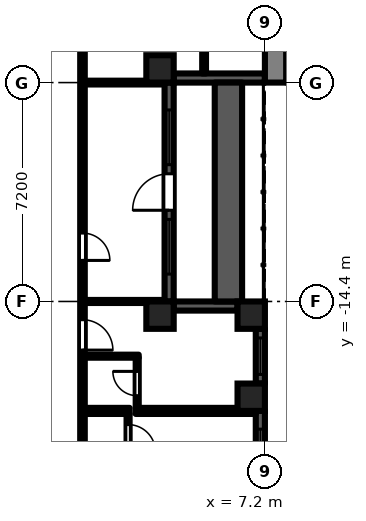
"""IFC4 building model, lengths in metres.
Left out: names, types, materials, properties, quantities, classifications, styles, units other than length and angle.
Written with IfcOpenShell. Run it as: python <this file> out.ifc"""

import sys

from ifc_helpers import new_model, si_unit, direction, frame, frame_2d, origin, origin_2d, place, context, subcontext, project, spatial, rectangle, extrude, element, fill, save


model = new_model("IFC4")
c1 = context("Model", 3, precision=1e-05, world=origin(), true_north=direction((0.0, 1.0)))
c2 = subcontext(c1, "Body", "Model", "MODEL_VIEW")
j1 = project(units=[si_unit("LENGTHUNIT", "METRE"), si_unit("PLANEANGLEUNIT", "RADIAN")], contexts=[c1])
p1 = place(None, origin())
s1 = spatial("IfcSite", under=j1, at=p1, CompositionType="ELEMENT")
p2 = place(p1, origin())
s2 = spatial("IfcBuilding", under=s1, at=p2, CompositionType="ELEMENT")
p3 = place(p2, frame((0.0, 0.0, 29.7)))
s3 = spatial("IfcBuildingStorey", under=s2, at=p3, CompositionType="ELEMENT", Elevation=29.7)
for number, where, z_axis, x_axis in (
    (1, (3.75, -14.85, 0.0), (0.0, 0.0, 1.0), (1.0, 0.0, 0.0)),
    (2, (3.75, -6.75, 0.0), (0.0, 0.0, 1.0), (1.0, 0.0, 0.0)),
    (3, (6.75, -17.55, 0.0), (0.0, 0.0, 1.0), (1.0, 0.0, 0.0)),
    (4, (6.75, -14.85, 0.0), (0.0, 0.0, 1.0), (1.0, 0.0, 0.0)),
):
    element("IfcColumn", number, at=place(p3, frame(where, z_axis=z_axis, x_axis=x_axis)), inside=s3, PredefinedType="COLUMN", context=c2, shape_type="SweptSolid", body=[
        extrude(rectangle(XDim=0.9, YDim=0.9, at=origin_2d()), origin(), (0.0, 0.0, 1.0), 3.0),
    ])
p4 = place(p3, frame((7.05, -21.15, 0.0), z_axis=(0.0, 0.0, 1.0), x_axis=(0.0, 1.0, 0.0)))
e5 = element("IfcWall", 5, at=p4, inside=s3, PredefinedType="SOLIDWALL", context=c2, shape_type="SweptSolid", body=[
    extrude(rectangle(XDim=3.15, YDim=0.3, at=frame_2d((1.575, 0.0))), origin(), (0.0, 0.0, 1.0), 2.1),
])
p5 = place(p4, frame((0.15, 0.0, 0.2)))
e6 = element("IfcOpeningElement", 6, at=p5, cuts=e5, PredefinedType="OPENING", context=c2, shape_type="SweptSolid", body=[
    extrude(rectangle(XDim=2.4, YDim=1.85, at=frame_2d((1.2, 0.925))), frame((0.0, 0.16, 0.0), z_axis=(0.0, -1.0, 0.0), x_axis=(1.0, 0.0, 0.0)), (0.0, 0.0, 1.0), 0.32),
])
p6 = place(p3, frame((7.05, -17.1, 0.0), z_axis=(0.0, 0.0, 1.0), x_axis=(0.0, 1.0, 0.0)))
e7 = element("IfcWall", 7, at=p6, inside=s3, PredefinedType="SOLIDWALL", context=c2, shape_type="SweptSolid", body=[
    extrude(rectangle(XDim=1.8, YDim=0.3, at=frame_2d((0.9, 0.0))), origin(), (0.0, 0.0, 1.0), 2.1),
])
p7 = place(p6, frame((0.3, 0.0, 0.2)))
e8 = element("IfcOpeningElement", 8, at=p7, cuts=e7, PredefinedType="OPENING", context=c2, shape_type="SweptSolid", body=[
    extrude(rectangle(XDim=1.2, YDim=1.85, at=frame_2d((0.6, 0.925))), frame((0.0, 0.16, 0.0), z_axis=(0.0, -1.0, 0.0), x_axis=(1.0, 0.0, 0.0)), (0.0, 0.0, 1.0), 0.32),
])
p8 = place(p3, frame((6.3, -14.55, 0.0), z_axis=(0.0, 0.0, 1.0), x_axis=(-1.0, 0.0, 0.0)))
e9 = element("IfcWall", 9, at=p8, inside=s3, PredefinedType="SOLIDWALL", context=c2, shape_type="SweptSolid", body=[
    extrude(rectangle(XDim=2.1, YDim=0.3, at=frame_2d((1.05, 0.0))), origin(), (0.0, 0.0, 1.0), 2.1),
])
p9 = place(p3, frame((4.05, -14.4, 0.0), z_axis=(0.0, 0.0, 1.0), x_axis=(0.0, 1.0, 0.0)))
e10 = element("IfcWall", 10, at=p9, inside=s3, PredefinedType="SOLIDWALL", context=c2, shape_type="SweptSolid", body=[
    extrude(rectangle(XDim=7.2, YDim=0.3, at=frame_2d((3.6, 0.0))), origin(), (0.0, 0.0, 1.0), 2.1),
])
p10 = place(p9, frame((3.0, 0.0, 0.0)))
e11 = element("IfcOpeningElement", 11, at=p10, cuts=e10, PredefinedType="OPENING", context=c2, shape_type="SweptSolid", body=[
    extrude(rectangle(XDim=1.2, YDim=2.05, at=frame_2d((0.6, 1.025))), frame((0.0, 0.16, 0.0), z_axis=(0.0, -1.0, 0.0), x_axis=(1.0, 0.0, 0.0)), (0.0, 0.0, 1.0), 0.32),
])
p11 = place(p9, frame((0.9, 0.0, 0.2)))
e12 = element("IfcOpeningElement", 12, at=p11, cuts=e10, PredefinedType="OPENING", context=c2, shape_type="SweptSolid", body=[
    extrude(rectangle(XDim=1.8, YDim=1.85, at=frame_2d((0.9, 0.925))), frame((0.0, 0.16, 0.0), z_axis=(0.0, -1.0, 0.0), x_axis=(1.0, 0.0, 0.0)), (0.0, 0.0, 1.0), 0.32),
])
p12 = place(p9, frame((4.5, 0.0, 0.2)))
e13 = element("IfcOpeningElement", 13, at=p12, cuts=e10, PredefinedType="OPENING", context=c2, shape_type="SweptSolid", body=[
    extrude(rectangle(XDim=1.8, YDim=1.85, at=frame_2d((0.9, 0.925))), frame((0.0, 0.16, 0.0), z_axis=(0.0, -1.0, 0.0), x_axis=(1.0, 0.0, 0.0)), (0.0, 0.0, 1.0), 0.32),
])
p13 = place(p3, frame((4.2, -7.05, 0.0), z_axis=(0.0, 0.0, 1.0), x_axis=(1.0, 0.0, 0.0)))
e14 = element("IfcWall", 14, at=p13, inside=s3, PredefinedType="SOLIDWALL", context=c2, shape_type="SweptSolid", body=[
    extrude(rectangle(XDim=3.0, YDim=0.3, at=frame_2d((1.5, 0.0))), origin(), (0.0, 0.0, 1.0), 2.1),
])
p14 = place(p3, frame((6.0, -14.4, 0.0), z_axis=(0.0, 0.0, 1.0), x_axis=(0.0, 1.0, 0.0)))
e15 = element("IfcWall", 15, at=p14, inside=s3, PredefinedType="PARAPET", context=c2, shape_type="SweptSolid", body=[
    extrude(rectangle(XDim=7.2, YDim=0.9, at=frame_2d((3.6, 0.0))), origin(), (0.0, 0.0, 1.0), 0.8),
])
p15 = place(p3, frame((7.55, -7.2, 0.0), z_axis=(0.0, 0.0, 1.0), x_axis=(0.0, 1.0, 0.0)))
e16 = element("IfcWall", 16, at=p15, inside=s3, PredefinedType="SHEAR", context=c2, shape_type="SweptSolid", body=[
    extrude(rectangle(XDim=14.4, YDim=0.7, at=frame_2d((7.2, 0.0))), origin(), (0.0, 0.0, 1.0), 2.575),
])
p16 = place(p15, frame((6.0, 0.0, 0.0)))
e17 = element("IfcOpeningElement", 17, at=p16, cuts=e16, PredefinedType="OPENING", context=c2, shape_type="SweptSolid", body=[
    extrude(rectangle(XDim=2.4, YDim=2.2, at=frame_2d((1.2, 1.1))), frame((0.0, 0.36, 0.0), z_axis=(0.0, -1.0, 0.0), x_axis=(1.0, 0.0, 0.0)), (0.0, 0.0, 1.0), 0.72),
])
p17 = place(p3, frame((1.2, -36.5, 0.0), z_axis=(0.0, 0.0, 1.0), x_axis=(0.0, 1.0, 0.0)))
e18 = element("IfcWall", 18, at=p17, inside=s3, PredefinedType="PARTITIONING", context=c2, shape_type="SweptSolid", body=[
    extrude(rectangle(XDim=35.375, YDim=0.15, at=frame_2d((17.688, 0.0))), origin(), (0.0, 0.0, 1.0), 2.575),
])
p18 = place(p17, frame((31.85, 0.0, 0.0)))
e19 = element("IfcOpeningElement", 19, at=p18, cuts=e18, PredefinedType="OPENING", context=c2, shape_type="SweptSolid", body=[
    extrude(rectangle(XDim=0.9, YDim=2.1, at=frame_2d((0.45, 1.05))), frame((0.0, 0.085, 0.0), z_axis=(0.0, -1.0, 0.0), x_axis=(1.0, 0.0, 0.0)), (0.0, 0.0, 1.0), 0.17),
])
p19 = place(p17, frame((23.45, 0.0, 0.0)))
e20 = element("IfcOpeningElement", 20, at=p19, cuts=e18, PredefinedType="OPENING", context=c2, shape_type="SweptSolid", body=[
    extrude(rectangle(XDim=0.9, YDim=2.1, at=frame_2d((0.45, 1.05))), frame((0.0, 0.085, 0.0), z_axis=(0.0, -1.0, 0.0), x_axis=(1.0, 0.0, 0.0)), (0.0, 0.0, 1.0), 0.17),
])
p20 = place(p17, frame((20.5, 0.0, 0.0)))
e21 = element("IfcOpeningElement", 21, at=p20, cuts=e18, PredefinedType="OPENING", context=c2, shape_type="SweptSolid", body=[
    extrude(rectangle(XDim=1.0, YDim=2.1, at=frame_2d((0.5, 1.05))), frame((0.0, 0.085, 0.0), z_axis=(0.0, -1.0, 0.0), x_axis=(1.0, 0.0, 0.0)), (0.0, 0.0, 1.0), 0.17),
])
p21 = place(p17, frame((1.55, 0.0, 0.0)))
e22 = element("IfcOpeningElement", 22, at=p21, cuts=e18, PredefinedType="OPENING", context=c2, shape_type="SweptSolid", body=[
    extrude(rectangle(XDim=1.0, YDim=2.1, at=frame_2d((0.5, 1.05))), frame((0.0, 0.085, 0.0), z_axis=(0.0, -1.0, 0.0), x_axis=(1.0, 0.0, 0.0)), (0.0, 0.0, 1.0), 0.17),
])
p22 = place(p3, frame((1.275, -18.0, 0.0), z_axis=(0.0, 0.0, 1.0), x_axis=(1.0, 0.0, 0.0)))
e23 = element("IfcWall", 23, at=p22, inside=s3, PredefinedType="PARTITIONING", context=c2, shape_type="SweptSolid", body=[
    extrude(rectangle(XDim=1.475, YDim=0.2, at=frame_2d((0.738, 0.0))), origin(), (0.0, 0.0, 1.0), 2.575),
])
p23 = place(p3, frame((1.275, -16.2, 0.0), z_axis=(0.0, 0.0, 1.0), x_axis=(1.0, 0.0, 0.0)))
e24 = element("IfcWall", 24, at=p23, inside=s3, PredefinedType="PARTITIONING", context=c2, shape_type="SweptSolid", body=[
    extrude(rectangle(XDim=1.775, YDim=0.1, at=frame_2d((0.888, 0.0))), origin(), (0.0, 0.0, 1.0), 2.575),
])
p24 = place(p3, frame((1.275, -14.4, 0.0), z_axis=(0.0, 0.0, 1.0), x_axis=(1.0, 0.0, 0.0)))
e25 = element("IfcWall", 25, at=p24, inside=s3, PredefinedType="PARTITIONING", context=c2, shape_type="SweptSolid", body=[
    extrude(rectangle(XDim=2.625, YDim=0.1, at=frame_2d((1.312, 0.0))), origin(), (0.0, 0.0, 1.0), 2.575),
])
p25 = place(p3, frame((1.275, -7.2, 0.0), z_axis=(0.0, 0.0, 1.0), x_axis=(1.0, 0.0, 0.0)))
e26 = element("IfcWall", 26, at=p25, inside=s3, PredefinedType="PARTITIONING", context=c2, shape_type="SweptSolid", body=[
    extrude(rectangle(XDim=2.625, YDim=0.125, at=frame_2d((1.312, 0.0))), origin(), (0.0, 0.0, 1.0), 2.575),
])
p26 = place(p3, frame((2.7, -32.35, 0.0), z_axis=(0.0, 0.0, 1.0), x_axis=(0.0, 1.0, 0.0)))
e27 = element("IfcWall", 27, at=p26, inside=s3, PredefinedType="PARTITIONING", context=c2, shape_type="SweptSolid", body=[
    extrude(rectangle(XDim=14.25, YDim=0.1, at=frame_2d((7.125, 0.0))), origin(), (0.0, 0.0, 1.0), 2.575),
])
p27 = place(p26, frame((0.4, 0.0, 0.0)))
e28 = element("IfcOpeningElement", 28, at=p27, cuts=e27, PredefinedType="OPENING", context=c2, shape_type="SweptSolid", body=[
    extrude(rectangle(XDim=0.9, YDim=2.1, at=frame_2d((0.45, 1.05))), frame((0.0, 0.06, 0.0), z_axis=(0.0, -1.0, 0.0), x_axis=(1.0, 0.0, 0.0)), (0.0, 0.0, 1.0), 0.12),
])
p28 = place(p26, frame((5.8, 0.0, 0.0)))
e29 = element("IfcOpeningElement", 29, at=p28, cuts=e27, PredefinedType="OPENING", context=c2, shape_type="SweptSolid", body=[
    extrude(rectangle(XDim=0.9, YDim=2.1, at=frame_2d((0.45, 1.05))), frame((0.0, 0.06, 0.0), z_axis=(0.0, -1.0, 0.0), x_axis=(1.0, 0.0, 0.0)), (0.0, 0.0, 1.0), 0.12),
])
p29 = place(p26, frame((7.6, 0.0, 0.0)))
e30 = element("IfcOpeningElement", 30, at=p29, cuts=e27, PredefinedType="OPENING", context=c2, shape_type="SweptSolid", body=[
    extrude(rectangle(XDim=0.9, YDim=2.1, at=frame_2d((0.45, 1.05))), frame((0.0, 0.06, 0.0), z_axis=(0.0, -1.0, 0.0), x_axis=(1.0, 0.0, 0.0)), (0.0, 0.0, 1.0), 0.12),
])
p30 = place(p26, frame((13.0, 0.0, 0.0)))
e31 = element("IfcOpeningElement", 31, at=p30, cuts=e27, PredefinedType="OPENING", context=c2, shape_type="SweptSolid", body=[
    extrude(rectangle(XDim=0.9, YDim=2.1, at=frame_2d((0.45, 1.05))), frame((0.0, 0.06, 0.0), z_axis=(0.0, -1.0, 0.0), x_axis=(1.0, 0.0, 0.0)), (0.0, 0.0, 1.0), 0.12),
])
p31 = place(p3, frame((3.0, -17.9, 0.0), z_axis=(0.0, 0.0, 1.0), x_axis=(0.0, 1.0, 0.0)))
e32 = element("IfcWall", 32, at=p31, inside=s3, PredefinedType="PARTITIONING", context=c2, shape_type="SweptSolid", body=[
    extrude(rectangle(XDim=1.65, YDim=0.1, at=frame_2d((0.825, 0.0))), origin(), (0.0, 0.0, 1.0), 2.575),
])
p32 = place(p31, frame((0.4, 0.0, 0.0)))
e33 = element("IfcOpeningElement", 33, at=p32, cuts=e32, PredefinedType="OPENING", context=c2, shape_type="SweptSolid", body=[
    extrude(rectangle(XDim=0.8, YDim=2.1, at=frame_2d((0.4, 1.05))), frame((0.0, 0.06, 0.0), z_axis=(0.0, -1.0, 0.0), x_axis=(1.0, 0.0, 0.0)), (0.0, 0.0, 1.0), 0.12),
])
p33 = place(p3, frame((2.95, -18.0, 0.0), z_axis=(0.0, 0.0, 1.0), x_axis=(1.0, 0.0, 0.0)))
e34 = element("IfcWall", 34, at=p33, inside=s3, PredefinedType="PARTITIONING", context=c2, shape_type="SweptSolid", body=[
    extrude(rectangle(XDim=3.95, YDim=0.2, at=frame_2d((1.975, 0.0))), origin(), (0.0, 0.0, 1.0), 2.575),
])
p34 = place(p3, frame((5.2, -6.9, 0.0), z_axis=(0.0, 0.0, 1.0), x_axis=(0.0, 1.0, 0.0)))
e35 = element("IfcWall", 35, at=p34, inside=s3, PredefinedType="PARTITIONING", context=c2, shape_type="SweptSolid", body=[
    extrude(rectangle(XDim=5.625, YDim=0.125, at=frame_2d((2.812, 0.0))), origin(), (0.0, 0.0, 1.0), 2.575),
])
p35 = place(p5, origin())
e36 = element("IfcWindow", 36, at=p35, inside=s3, PartitioningType="SINGLE_PANEL", PredefinedType="WINDOW", context=c2, shape_type="SweptSolid", body=[
    extrude(rectangle(XDim=2.4, YDim=1.85, at=frame_2d((1.2, 0.925))), frame((0.0, 0.03, 0.0), z_axis=(0.0, -1.0, 0.0), x_axis=(1.0, 0.0, 0.0)), (0.0, 0.0, 1.0), 0.06),
])
fill(e6, e36)
p36 = place(p7, origin())
e37 = element("IfcWindow", 37, at=p36, inside=s3, PartitioningType="SINGLE_PANEL", PredefinedType="WINDOW", context=c2, shape_type="SweptSolid", body=[
    extrude(rectangle(XDim=1.2, YDim=1.85, at=frame_2d((0.6, 0.925))), frame((0.0, 0.03, 0.0), z_axis=(0.0, -1.0, 0.0), x_axis=(1.0, 0.0, 0.0)), (0.0, 0.0, 1.0), 0.06),
])
fill(e8, e37)
p37 = place(p10, origin())
e38 = element("IfcDoor", 38, at=p37, inside=s3, OperationType="SINGLE_SWING_LEFT", PredefinedType="DOOR", context=c2, shape_type="SweptSolid", body=[
    extrude(rectangle(XDim=1.2, YDim=2.05, at=frame_2d((0.6, 1.025))), frame((0.0, 0.025, 0.0), z_axis=(0.0, -1.0, 0.0), x_axis=(1.0, 0.0, 0.0)), (0.0, 0.0, 1.0), 0.05),
])
fill(e11, e38)
p38 = place(p11, origin())
e39 = element("IfcWindow", 39, at=p38, inside=s3, PartitioningType="SINGLE_PANEL", PredefinedType="WINDOW", context=c2, shape_type="SweptSolid", body=[
    extrude(rectangle(XDim=1.8, YDim=1.85, at=frame_2d((0.9, 0.925))), frame((0.0, 0.03, 0.0), z_axis=(0.0, -1.0, 0.0), x_axis=(1.0, 0.0, 0.0)), (0.0, 0.0, 1.0), 0.06),
])
fill(e12, e39)
p39 = place(p12, origin())
e40 = element("IfcWindow", 40, at=p39, inside=s3, PartitioningType="SINGLE_PANEL", PredefinedType="WINDOW", context=c2, shape_type="SweptSolid", body=[
    extrude(rectangle(XDim=1.8, YDim=1.85, at=frame_2d((0.9, 0.925))), frame((0.0, 0.03, 0.0), z_axis=(0.0, -1.0, 0.0), x_axis=(1.0, 0.0, 0.0)), (0.0, 0.0, 1.0), 0.06),
])
fill(e13, e40)
p40 = place(p19, frame((0.9, 0.0, 0.0), z_axis=(0.0, 0.0, 1.0), x_axis=(-1.0, 0.0, 0.0)))
e41 = element("IfcDoor", 41, at=p40, inside=s3, OperationType="SINGLE_SWING_RIGHT", PredefinedType="DOOR", context=c2, shape_type="SweptSolid", body=[
    extrude(rectangle(XDim=0.9, YDim=2.1, at=frame_2d((0.45, 1.05))), frame((0.0, 0.025, 0.0), z_axis=(0.0, -1.0, 0.0), x_axis=(1.0, 0.0, 0.0)), (0.0, 0.0, 1.0), 0.05),
])
fill(e20, e41)
p41 = place(p32, origin())
e42 = element("IfcDoor", 42, at=p41, inside=s3, OperationType="SINGLE_SWING_RIGHT", PredefinedType="DOOR", context=c2, shape_type="SweptSolid", body=[
    extrude(rectangle(XDim=0.8, YDim=2.1, at=frame_2d((0.4, 1.05))), frame((0.0, 0.025, 0.0), z_axis=(0.0, -1.0, 0.0), x_axis=(1.0, 0.0, 0.0)), (0.0, 0.0, 1.0), 0.05),
])
fill(e33, e42)
p42 = place(p20, frame((1.0, 0.0, 0.0), z_axis=(0.0, 0.0, 1.0), x_axis=(-1.0, 0.0, 0.0)))
e43 = element("IfcDoor", 43, at=p42, inside=s3, OperationType="SINGLE_SWING_RIGHT", PredefinedType="DOOR", context=c2, shape_type="SweptSolid", body=[
    extrude(rectangle(XDim=1.0, YDim=2.1, at=frame_2d((0.5, 1.05))), frame((0.0, 0.025, 0.0), z_axis=(0.0, -1.0, 0.0), x_axis=(1.0, 0.0, 0.0)), (0.0, 0.0, 1.0), 0.05),
])
fill(e21, e43)
p43 = place(p30, frame((0.9, 0.0, 0.0), z_axis=(0.0, 0.0, 1.0), x_axis=(-1.0, 0.0, 0.0)))
e44 = element("IfcDoor", 44, at=p43, inside=s3, OperationType="SINGLE_SWING_RIGHT", PredefinedType="DOOR", context=c2, shape_type="SweptSolid", body=[
    extrude(rectangle(XDim=0.9, YDim=2.1, at=frame_2d((0.45, 1.05))), frame((0.0, 0.025, 0.0), z_axis=(0.0, -1.0, 0.0), x_axis=(1.0, 0.0, 0.0)), (0.0, 0.0, 1.0), 0.05),
])
fill(e31, e44)
save(model, sys.argv[1])
